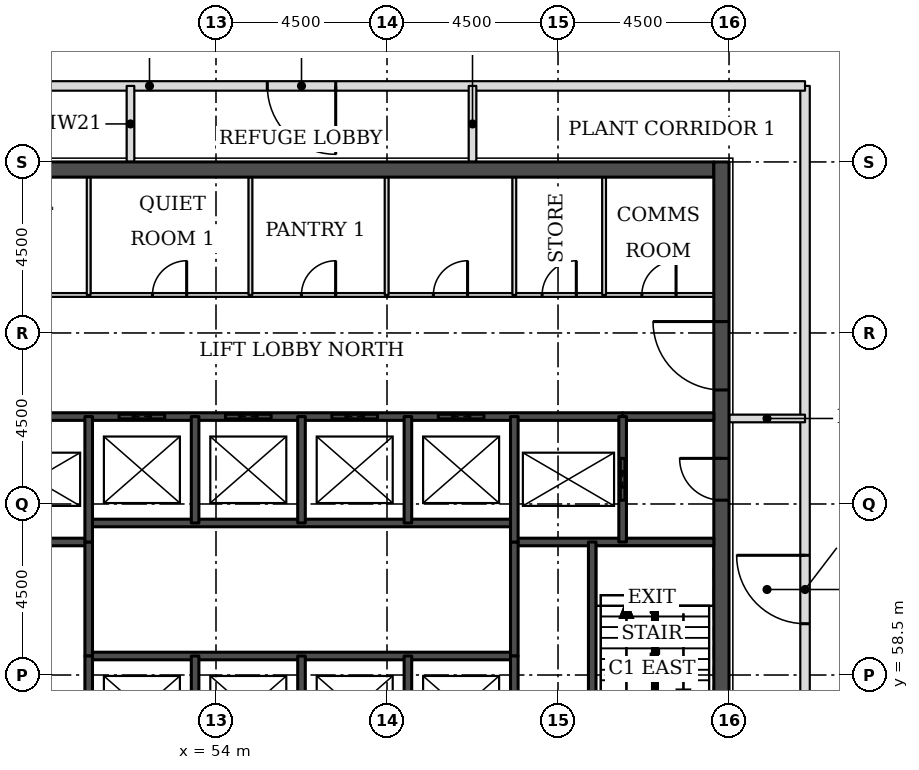
"""IFC4 building model, lengths in metres.
Left out: names, types, materials, properties, quantities, classifications, styles, units other than length and angle.
Written with IfcOpenShell. Run it as: python <this file> out.ifc"""

import sys

from ifc_helpers import new_model, si_unit, direction, frame, frame_2d, origin, place, context, subcontext, project, spatial, rectangle, extrude, element, fill, save


model = new_model("IFC4")
c1 = context("Model", 3, precision=1e-05, world=origin(), true_north=direction((0.0, 1.0)))
c2 = subcontext(c1, "Body", "Model", "MODEL_VIEW")
j1 = project(units=[si_unit("LENGTHUNIT", "METRE"), si_unit("PLANEANGLEUNIT", "RADIAN")], contexts=[c1])
p1 = place(None, origin())
s1 = spatial("IfcSite", under=j1, at=p1, CompositionType="ELEMENT")
p2 = place(p1, origin())
s2 = spatial("IfcBuilding", under=s1, at=p2, CompositionType="ELEMENT")
p3 = place(p2, frame((0.0, 0.0, 206.9)))
s3 = spatial("IfcBuildingStorey", under=s2, at=p3, CompositionType="ELEMENT", Elevation=206.9)
p4 = place(p3, frame((45.4, 71.8, 0.0), z_axis=(0.0, 0.0, 1.0), x_axis=(1.0, 0.0, 0.0)))
e1 = element("IfcWall", 1, at=p4, inside=s3, PredefinedType="SHEAR", context=c2, shape_type="SweptSolid", body=[
    extrude(rectangle(XDim=21.7, YDim=0.4, at=frame_2d((10.85, 0.0))), origin(), (0.0, 0.0, 1.0), 5.0),
])
p5 = place(p3, frame((67.3, 49.5, 0.0), z_axis=(0.0, 0.0, 1.0), x_axis=(0.0, 1.0, 0.0)))
e2 = element("IfcWall", 2, at=p5, inside=s3, PredefinedType="SHEAR", context=c2, shape_type="SweptSolid", body=[
    extrude(rectangle(XDim=22.5, YDim=0.4, at=frame_2d((11.25, 0.0))), origin(), (0.0, 0.0, 1.0), 5.0),
])
p6 = place(p5, frame((4.2, 0.0, 0.0)))
e3 = element("IfcOpeningElement", 3, at=p6, cuts=e2, PredefinedType="OPENING", context=c2, shape_type="SweptSolid", body=[
    extrude(rectangle(XDim=1.8, YDim=2.1, at=frame_2d((0.9, 1.05))), frame((0.0, 0.21, 0.0), z_axis=(0.0, -1.0, 0.0), x_axis=(1.0, 0.0, 0.0)), (0.0, 0.0, 1.0), 0.42),
])
p7 = place(p5, frame((6.9, 0.0, 0.0)))
e4 = element("IfcOpeningElement", 4, at=p7, cuts=e2, PredefinedType="OPENING", context=c2, shape_type="SweptSolid", body=[
    extrude(rectangle(XDim=1.1, YDim=2.1, at=frame_2d((0.55, 1.05))), frame((0.0, 0.21, 0.0), z_axis=(0.0, -1.0, 0.0), x_axis=(1.0, 0.0, 0.0)), (0.0, 0.0, 1.0), 0.42),
])
p8 = place(p5, frame((13.6, 0.0, 0.0)))
e5 = element("IfcOpeningElement", 5, at=p8, cuts=e2, PredefinedType="OPENING", context=c2, shape_type="SweptSolid", body=[
    extrude(rectangle(XDim=1.1, YDim=2.1, at=frame_2d((0.55, 1.05))), frame((0.0, 0.21, 0.0), z_axis=(0.0, -1.0, 0.0), x_axis=(1.0, 0.0, 0.0)), (0.0, 0.0, 1.0), 0.42),
])
p9 = place(p5, frame((16.5, 0.0, 0.0)))
e6 = element("IfcOpeningElement", 6, at=p9, cuts=e2, PredefinedType="OPENING", context=c2, shape_type="SweptSolid", body=[
    extrude(rectangle(XDim=1.8, YDim=2.1, at=frame_2d((0.9, 1.05))), frame((0.0, 0.21, 0.0), z_axis=(0.0, -1.0, 0.0), x_axis=(1.0, 0.0, 0.0)), (0.0, 0.0, 1.0), 0.42),
])
p10 = place(p3, frame((69.5, 47.5, 0.0), z_axis=(0.0, 0.0, 1.0), x_axis=(0.0, 1.0, 0.0)))
e7 = element("IfcWall", 7, at=p10, inside=s3, PredefinedType="PARTITIONING", context=c2, shape_type="SweptSolid", body=[
    extrude(rectangle(XDim=26.5, YDim=0.25, at=frame_2d((13.25, 0.0))), origin(), (0.0, 0.0, 1.0), 4.85),
])
p11 = place(p10, frame((12.35, 0.0, 0.0)))
e8 = element("IfcOpeningElement", 8, at=p11, cuts=e7, PredefinedType="OPENING", context=c2, shape_type="SweptSolid", body=[
    extrude(rectangle(XDim=1.8, YDim=2.1, at=frame_2d((0.9, 1.05))), frame((0.0, 0.135, 0.0), z_axis=(0.0, -1.0, 0.0), x_axis=(1.0, 0.0, 0.0)), (0.0, 0.0, 1.0), 0.27),
])
p12 = place(p3, frame((43.0, 74.0, 0.0), z_axis=(0.0, 0.0, 1.0), x_axis=(1.0, 0.0, 0.0)))
e9 = element("IfcWall", 9, at=p12, inside=s3, PredefinedType="PARTITIONING", context=c2, shape_type="SweptSolid", body=[
    extrude(rectangle(XDim=26.5, YDim=0.25, at=frame_2d((13.25, 0.0))), origin(), (0.0, 0.0, 1.0), 4.85),
])
p13 = place(p12, frame((12.35, 0.0, 0.0)))
e10 = element("IfcOpeningElement", 10, at=p13, cuts=e9, PredefinedType="OPENING", context=c2, shape_type="SweptSolid", body=[
    extrude(rectangle(XDim=1.8, YDim=2.1, at=frame_2d((0.9, 1.05))), frame((0.0, 0.135, 0.0), z_axis=(0.0, -1.0, 0.0), x_axis=(1.0, 0.0, 0.0)), (0.0, 0.0, 1.0), 0.27),
])
for number, where, z_axis, x_axis in (
    (11, (67.5, 65.25, 0.0), (0.0, 0.0, 1.0), (1.0, 0.0, 0.0)),
    (12, (51.75, 72.0, 0.0), (0.0, 0.0, 1.0), (0.0, 1.0, 0.0)),
    (13, (60.75, 72.0, 0.0), (0.0, 0.0, 1.0), (0.0, 1.0, 0.0)),
):
    element("IfcWall", number, at=place(p3, frame(where, z_axis=z_axis, x_axis=x_axis)), inside=s3, PredefinedType="PARTITIONING", context=c2, shape_type="SweptSolid", body=[
        extrude(rectangle(XDim=2.0, YDim=0.2, at=frame_2d((1.0, 0.0))), origin(), (0.0, 0.0, 1.0), 4.85),
    ])
p14 = place(p3, frame((50.65, 59.0, 0.0), z_axis=(0.0, 0.0, 1.0), x_axis=(1.0, 0.0, 0.0)))
e14 = element("IfcWall", 14, at=p14, inside=s3, PredefinedType="SOLIDWALL", context=c2, shape_type="SweptSolid", body=[
    extrude(rectangle(XDim=11.2, YDim=0.2, at=frame_2d((5.6, 0.0))), origin(), (0.0, 0.0, 1.0), 5.0),
])
for number, where, z_axis, x_axis in (
    (15, (45.4, 62.0, 0.0), (0.0, 0.0, 1.0), (1.0, 0.0, 0.0)),
    (16, (61.85, 62.0, 0.0), (0.0, 0.0, 1.0), (1.0, 0.0, 0.0)),
):
    element("IfcWall", number, at=place(p3, frame(where, z_axis=z_axis, x_axis=x_axis)), inside=s3, PredefinedType="SOLIDWALL", context=c2, shape_type="SweptSolid", body=[
        extrude(rectangle(XDim=5.25, YDim=0.2, at=frame_2d((2.625, 0.0))), origin(), (0.0, 0.0, 1.0), 4.85),
    ])
p15 = place(p3, frame((50.65, 62.5, 0.0), z_axis=(0.0, 0.0, 1.0), x_axis=(1.0, 0.0, 0.0)))
e17 = element("IfcWall", 17, at=p15, inside=s3, PredefinedType="SOLIDWALL", context=c2, shape_type="SweptSolid", body=[
    extrude(rectangle(XDim=11.2, YDim=0.2, at=frame_2d((5.6, 0.0))), origin(), (0.0, 0.0, 1.0), 5.0),
])
p16 = place(p3, frame((64.7, 65.3, 0.0), z_axis=(0.0, 0.0, 1.0), x_axis=(1.0, 0.0, 0.0)))
e18 = element("IfcWall", 18, at=p16, inside=s3, PredefinedType="SOLIDWALL", context=c2, shape_type="SweptSolid", body=[
    extrude(rectangle(XDim=2.4, YDim=0.2, at=frame_2d((1.2, 0.0))), origin(), (0.0, 0.0, 1.0), 4.85),
])
p17 = place(p3, frame((47.8, 65.3, 0.0), z_axis=(0.0, 0.0, 1.0), x_axis=(1.0, 0.0, 0.0)))
e19 = element("IfcWall", 19, at=p17, inside=s3, PredefinedType="SOLIDWALL", context=c2, shape_type="SweptSolid", body=[
    extrude(rectangle(XDim=16.9, YDim=0.2, at=frame_2d((8.45, 0.0))), origin(), (0.0, 0.0, 1.0), 4.85),
])
p18 = place(p17, frame((3.65, 0.0, 0.0)))
e20 = element("IfcOpeningElement", 20, at=p18, cuts=e19, PredefinedType="OPENING", context=c2, shape_type="SweptSolid", body=[
    extrude(rectangle(XDim=1.2, YDim=2.1, at=frame_2d((0.6, 1.05))), frame((0.0, 0.11, 0.0), z_axis=(0.0, -1.0, 0.0), x_axis=(1.0, 0.0, 0.0)), (0.0, 0.0, 1.0), 0.22),
])
p19 = place(p17, frame((6.45, 0.0, 0.0)))
e21 = element("IfcOpeningElement", 21, at=p19, cuts=e19, PredefinedType="OPENING", context=c2, shape_type="SweptSolid", body=[
    extrude(rectangle(XDim=1.2, YDim=2.1, at=frame_2d((0.6, 1.05))), frame((0.0, 0.11, 0.0), z_axis=(0.0, -1.0, 0.0), x_axis=(1.0, 0.0, 0.0)), (0.0, 0.0, 1.0), 0.22),
])
p20 = place(p17, frame((9.25, 0.0, 0.0)))
e22 = element("IfcOpeningElement", 22, at=p20, cuts=e19, PredefinedType="OPENING", context=c2, shape_type="SweptSolid", body=[
    extrude(rectangle(XDim=1.2, YDim=2.1, at=frame_2d((0.6, 1.05))), frame((0.0, 0.11, 0.0), z_axis=(0.0, -1.0, 0.0), x_axis=(1.0, 0.0, 0.0)), (0.0, 0.0, 1.0), 0.22),
])
p21 = place(p17, frame((12.05, 0.0, 0.0)))
e23 = element("IfcOpeningElement", 23, at=p21, cuts=e19, PredefinedType="OPENING", context=c2, shape_type="SweptSolid", body=[
    extrude(rectangle(XDim=1.2, YDim=2.1, at=frame_2d((0.6, 1.05))), frame((0.0, 0.11, 0.0), z_axis=(0.0, -1.0, 0.0), x_axis=(1.0, 0.0, 0.0)), (0.0, 0.0, 1.0), 0.22),
])
p22 = place(p3, frame((45.4, 68.5, 0.0), z_axis=(0.0, 0.0, 1.0), x_axis=(1.0, 0.0, 0.0)))
e24 = element("IfcWall", 24, at=p22, inside=s3, PredefinedType="PARTITIONING", context=c2, shape_type="SweptSolid", body=[
    extrude(rectangle(XDim=21.7, YDim=0.1, at=frame_2d((10.85, 0.0))), origin(), (0.0, 0.0, 1.0), 4.85),
])
p23 = place(p22, frame((19.806, 0.0, 0.0)))
e25 = element("IfcOpeningElement", 25, at=p23, cuts=e24, PredefinedType="OPENING", context=c2, shape_type="SweptSolid", body=[
    extrude(rectangle(XDim=0.9, YDim=2.1, at=frame_2d((0.45, 1.05))), frame((0.0, 0.06, 0.0), z_axis=(0.0, -1.0, 0.0), x_axis=(1.0, 0.0, 0.0)), (0.0, 0.0, 1.0), 0.12),
])
p24 = place(p22, frame((17.181, 0.0, 0.0)))
e26 = element("IfcOpeningElement", 26, at=p24, cuts=e24, PredefinedType="OPENING", context=c2, shape_type="SweptSolid", body=[
    extrude(rectangle(XDim=0.9, YDim=2.1, at=frame_2d((0.45, 1.05))), frame((0.0, 0.06, 0.0), z_axis=(0.0, -1.0, 0.0), x_axis=(1.0, 0.0, 0.0)), (0.0, 0.0, 1.0), 0.12),
])
p25 = place(p22, frame((2.175, 0.0, 0.0)))
e27 = element("IfcOpeningElement", 27, at=p25, cuts=e24, PredefinedType="OPENING", context=c2, shape_type="SweptSolid", body=[
    extrude(rectangle(XDim=0.9, YDim=2.1, at=frame_2d((0.45, 1.05))), frame((0.0, 0.06, 0.0), z_axis=(0.0, -1.0, 0.0), x_axis=(1.0, 0.0, 0.0)), (0.0, 0.0, 1.0), 0.12),
])
p26 = place(p22, frame((14.32, 0.0, 0.0)))
e28 = element("IfcOpeningElement", 28, at=p26, cuts=e24, PredefinedType="OPENING", context=c2, shape_type="SweptSolid", body=[
    extrude(rectangle(XDim=0.9, YDim=2.1, at=frame_2d((0.45, 1.05))), frame((0.0, 0.06, 0.0), z_axis=(0.0, -1.0, 0.0), x_axis=(1.0, 0.0, 0.0)), (0.0, 0.0, 1.0), 0.12),
])
p27 = place(p22, frame((10.848, 0.0, 0.0)))
e29 = element("IfcOpeningElement", 29, at=p27, cuts=e24, PredefinedType="OPENING", context=c2, shape_type="SweptSolid", body=[
    extrude(rectangle(XDim=0.9, YDim=2.1, at=frame_2d((0.45, 1.05))), frame((0.0, 0.06, 0.0), z_axis=(0.0, -1.0, 0.0), x_axis=(1.0, 0.0, 0.0)), (0.0, 0.0, 1.0), 0.12),
])
p28 = place(p22, frame((6.928, 0.0, 0.0)))
e30 = element("IfcOpeningElement", 30, at=p28, cuts=e24, PredefinedType="OPENING", context=c2, shape_type="SweptSolid", body=[
    extrude(rectangle(XDim=0.9, YDim=2.1, at=frame_2d((0.45, 1.05))), frame((0.0, 0.06, 0.0), z_axis=(0.0, -1.0, 0.0), x_axis=(1.0, 0.0, 0.0)), (0.0, 0.0, 1.0), 0.12),
])
p29 = place(p3, frame((50.65, 68.5, 0.0), z_axis=(0.0, 0.0, 1.0), x_axis=(0.0, 1.0, 0.0)))
e31 = element("IfcWall", 31, at=p29, inside=s3, PredefinedType="PARTITIONING", context=c2, shape_type="SweptSolid", body=[
    extrude(rectangle(XDim=3.1, YDim=0.1, at=frame_2d((1.55, 0.0))), origin(), (0.0, 0.0, 1.0), 4.85),
])
p30 = place(p3, frame((50.65, 59.0, 0.0), z_axis=(0.0, 0.0, 1.0), x_axis=(0.0, 1.0, 0.0)))
e32 = element("IfcWall", 32, at=p30, inside=s3, PredefinedType="SOLIDWALL", context=c2, shape_type="SweptSolid", body=[
    extrude(rectangle(XDim=3.0, YDim=0.2, at=frame_2d((1.5, 0.0))), origin(), (0.0, 0.0, 1.0), 5.0),
])
p31 = place(p3, frame((50.65, 56.2, 0.0), z_axis=(0.0, 0.0, 1.0), x_axis=(0.0, 1.0, 0.0)))
e33 = element("IfcWall", 33, at=p31, inside=s3, PredefinedType="SOLIDWALL", context=c2, shape_type="SweptSolid", body=[
    extrude(rectangle(XDim=2.8, YDim=0.2, at=frame_2d((1.4, 0.0))), origin(), (0.0, 0.0, 1.0), 4.85),
])
p32 = place(p3, frame((50.65, 62.0, 0.0), z_axis=(0.0, 0.0, 1.0), x_axis=(0.0, 1.0, 0.0)))
e34 = element("IfcWall", 34, at=p32, inside=s3, PredefinedType="SOLIDWALL", context=c2, shape_type="SweptSolid", body=[
    extrude(rectangle(XDim=3.3, YDim=0.2, at=frame_2d((1.65, 0.0))), origin(), (0.0, 0.0, 1.0), 4.85),
])
for number, where, z_axis, x_axis in (
    (35, (53.45, 56.2, 0.0), (0.0, 0.0, 1.0), (0.0, 1.0, 0.0)),
    (36, (53.45, 62.5, 0.0), (0.0, 0.0, 1.0), (0.0, 1.0, 0.0)),
):
    element("IfcWall", number, at=place(p3, frame(where, z_axis=z_axis, x_axis=x_axis)), inside=s3, PredefinedType="SOLIDWALL", context=c2, shape_type="SweptSolid", body=[
        extrude(rectangle(XDim=2.8, YDim=0.2, at=frame_2d((1.4, 0.0))), origin(), (0.0, 0.0, 1.0), 4.85),
    ])
p33 = place(p3, frame((54.906, 68.5, 0.0), z_axis=(0.0, 0.0, 1.0), x_axis=(0.0, 1.0, 0.0)))
e37 = element("IfcWall", 37, at=p33, inside=s3, PredefinedType="PARTITIONING", context=c2, shape_type="SweptSolid", body=[
    extrude(rectangle(XDim=3.1, YDim=0.1, at=frame_2d((1.55, 0.0))), origin(), (0.0, 0.0, 1.0), 4.85),
])
for number, where, z_axis, x_axis in (
    (38, (56.25, 56.2, 0.0), (0.0, 0.0, 1.0), (0.0, 1.0, 0.0)),
    (39, (56.25, 62.5, 0.0), (0.0, 0.0, 1.0), (0.0, 1.0, 0.0)),
):
    element("IfcWall", number, at=place(p3, frame(where, z_axis=z_axis, x_axis=x_axis)), inside=s3, PredefinedType="SOLIDWALL", context=c2, shape_type="SweptSolid", body=[
        extrude(rectangle(XDim=2.8, YDim=0.2, at=frame_2d((1.4, 0.0))), origin(), (0.0, 0.0, 1.0), 4.85),
    ])
p34 = place(p3, frame((58.49, 68.5, 0.0), z_axis=(0.0, 0.0, 1.0), x_axis=(0.0, 1.0, 0.0)))
e40 = element("IfcWall", 40, at=p34, inside=s3, PredefinedType="PARTITIONING", context=c2, shape_type="SweptSolid", body=[
    extrude(rectangle(XDim=3.1, YDim=0.1, at=frame_2d((1.55, 0.0))), origin(), (0.0, 0.0, 1.0), 4.85),
])
for number, where, z_axis, x_axis in (
    (41, (59.05, 56.2, 0.0), (0.0, 0.0, 1.0), (0.0, 1.0, 0.0)),
    (42, (59.05, 62.5, 0.0), (0.0, 0.0, 1.0), (0.0, 1.0, 0.0)),
):
    element("IfcWall", number, at=place(p3, frame(where, z_axis=z_axis, x_axis=x_axis)), inside=s3, PredefinedType="SOLIDWALL", context=c2, shape_type="SweptSolid", body=[
        extrude(rectangle(XDim=2.8, YDim=0.2, at=frame_2d((1.4, 0.0))), origin(), (0.0, 0.0, 1.0), 4.85),
    ])
p35 = place(p3, frame((61.85, 68.5, 0.0), z_axis=(0.0, 0.0, 1.0), x_axis=(0.0, 1.0, 0.0)))
e43 = element("IfcWall", 43, at=p35, inside=s3, PredefinedType="PARTITIONING", context=c2, shape_type="SweptSolid", body=[
    extrude(rectangle(XDim=3.1, YDim=0.1, at=frame_2d((1.55, 0.0))), origin(), (0.0, 0.0, 1.0), 4.85),
])
p36 = place(p3, frame((61.85, 59.0, 0.0), z_axis=(0.0, 0.0, 1.0), x_axis=(0.0, 1.0, 0.0)))
e44 = element("IfcWall", 44, at=p36, inside=s3, PredefinedType="SOLIDWALL", context=c2, shape_type="SweptSolid", body=[
    extrude(rectangle(XDim=3.0, YDim=0.2, at=frame_2d((1.5, 0.0))), origin(), (0.0, 0.0, 1.0), 5.0),
])
p37 = place(p3, frame((61.85, 56.2, 0.0), z_axis=(0.0, 0.0, 1.0), x_axis=(0.0, 1.0, 0.0)))
e45 = element("IfcWall", 45, at=p37, inside=s3, PredefinedType="SOLIDWALL", context=c2, shape_type="SweptSolid", body=[
    extrude(rectangle(XDim=2.8, YDim=0.2, at=frame_2d((1.4, 0.0))), origin(), (0.0, 0.0, 1.0), 4.85),
])
p38 = place(p3, frame((61.85, 62.0, 0.0), z_axis=(0.0, 0.0, 1.0), x_axis=(0.0, 1.0, 0.0)))
e46 = element("IfcWall", 46, at=p38, inside=s3, PredefinedType="SOLIDWALL", context=c2, shape_type="SweptSolid", body=[
    extrude(rectangle(XDim=3.3, YDim=0.2, at=frame_2d((1.65, 0.0))), origin(), (0.0, 0.0, 1.0), 4.85),
])
p39 = place(p3, frame((63.9, 56.2, 0.0), z_axis=(0.0, 0.0, 1.0), x_axis=(0.0, 1.0, 0.0)))
e47 = element("IfcWall", 47, at=p39, inside=s3, PredefinedType="SOLIDWALL", context=c2, shape_type="SweptSolid", body=[
    extrude(rectangle(XDim=5.8, YDim=0.2, at=frame_2d((2.9, 0.0))), origin(), (0.0, 0.0, 1.0), 4.85),
])
p40 = place(p3, frame((64.212, 68.5, 0.0), z_axis=(0.0, 0.0, 1.0), x_axis=(0.0, 1.0, 0.0)))
e48 = element("IfcWall", 48, at=p40, inside=s3, PredefinedType="PARTITIONING", context=c2, shape_type="SweptSolid", body=[
    extrude(rectangle(XDim=3.1, YDim=0.1, at=frame_2d((1.55, 0.0))), origin(), (0.0, 0.0, 1.0), 4.85),
])
p41 = place(p3, frame((64.7, 62.0, 0.0), z_axis=(0.0, 0.0, 1.0), x_axis=(0.0, 1.0, 0.0)))
e49 = element("IfcWall", 49, at=p41, inside=s3, PredefinedType="SOLIDWALL", context=c2, shape_type="SweptSolid", body=[
    extrude(rectangle(XDim=3.3, YDim=0.2, at=frame_2d((1.65, 0.0))), origin(), (0.0, 0.0, 1.0), 4.85),
])
p42 = place(p41, frame((1.1, 0.0, 0.0)))
e50 = element("IfcOpeningElement", 50, at=p42, cuts=e49, PredefinedType="OPENING", context=c2, shape_type="SweptSolid", body=[
    extrude(rectangle(XDim=1.1, YDim=2.1, at=frame_2d((0.55, 1.05))), frame((0.0, 0.11, 0.0), z_axis=(0.0, -1.0, 0.0), x_axis=(1.0, 0.0, 0.0)), (0.0, 0.0, 1.0), 0.22),
])
p43 = place(p13, frame((1.8, 0.0, 0.0), z_axis=(0.0, 0.0, 1.0), x_axis=(-1.0, 0.0, 0.0)))
e51 = element("IfcDoor", 51, at=p43, inside=s3, OperationType="SINGLE_SWING_LEFT", PredefinedType="DOOR", context=c2, shape_type="SweptSolid", body=[
    extrude(rectangle(XDim=1.8, YDim=2.1, at=frame_2d((0.9, 1.05))), frame((0.0, 0.025, 0.0), z_axis=(0.0, -1.0, 0.0), x_axis=(1.0, 0.0, 0.0)), (0.0, 0.0, 1.0), 0.05),
])
fill(e10, e51)
p44 = place(p11, origin())
e52 = element("IfcDoor", 52, at=p44, inside=s3, OperationType="SINGLE_SWING_RIGHT", PredefinedType="DOOR", context=c2, shape_type="SweptSolid", body=[
    extrude(rectangle(XDim=1.8, YDim=2.1, at=frame_2d((0.9, 1.05))), frame((0.0, 0.025, 0.0), z_axis=(0.0, -1.0, 0.0), x_axis=(1.0, 0.0, 0.0)), (0.0, 0.0, 1.0), 0.05),
])
fill(e8, e52)
p45 = place(p18, origin())
e53 = element("IfcDoor", 53, at=p45, inside=s3, OperationType="DOUBLE_DOOR_SLIDING", PredefinedType="DOOR", context=c2, shape_type="SweptSolid", body=[
    extrude(rectangle(XDim=1.2, YDim=2.1, at=frame_2d((0.6, 1.05))), frame((0.0, 0.025, 0.0), z_axis=(0.0, -1.0, 0.0), x_axis=(1.0, 0.0, 0.0)), (0.0, 0.0, 1.0), 0.05),
])
fill(e20, e53)
p46 = place(p19, origin())
e54 = element("IfcDoor", 54, at=p46, inside=s3, OperationType="DOUBLE_DOOR_SLIDING", PredefinedType="DOOR", context=c2, shape_type="SweptSolid", body=[
    extrude(rectangle(XDim=1.2, YDim=2.1, at=frame_2d((0.6, 1.05))), frame((0.0, 0.025, 0.0), z_axis=(0.0, -1.0, 0.0), x_axis=(1.0, 0.0, 0.0)), (0.0, 0.0, 1.0), 0.05),
])
fill(e21, e54)
p47 = place(p20, origin())
e55 = element("IfcDoor", 55, at=p47, inside=s3, OperationType="DOUBLE_DOOR_SLIDING", PredefinedType="DOOR", context=c2, shape_type="SweptSolid", body=[
    extrude(rectangle(XDim=1.2, YDim=2.1, at=frame_2d((0.6, 1.05))), frame((0.0, 0.025, 0.0), z_axis=(0.0, -1.0, 0.0), x_axis=(1.0, 0.0, 0.0)), (0.0, 0.0, 1.0), 0.05),
])
fill(e22, e55)
p48 = place(p21, origin())
e56 = element("IfcDoor", 56, at=p48, inside=s3, OperationType="DOUBLE_DOOR_SLIDING", PredefinedType="DOOR", context=c2, shape_type="SweptSolid", body=[
    extrude(rectangle(XDim=1.2, YDim=2.1, at=frame_2d((0.6, 1.05))), frame((0.0, 0.025, 0.0), z_axis=(0.0, -1.0, 0.0), x_axis=(1.0, 0.0, 0.0)), (0.0, 0.0, 1.0), 0.05),
])
fill(e23, e56)
p49 = place(p42, origin())
e57 = element("IfcDoor", 57, at=p49, inside=s3, OperationType="DOUBLE_DOOR_SLIDING", PredefinedType="DOOR", context=c2, shape_type="SweptSolid", body=[
    extrude(rectangle(XDim=1.1, YDim=2.1, at=frame_2d((0.55, 1.05))), frame((0.0, 0.025, 0.0), z_axis=(0.0, -1.0, 0.0), x_axis=(1.0, 0.0, 0.0)), (0.0, 0.0, 1.0), 0.05),
])
fill(e50, e57)
p50 = place(p8, origin())
e58 = element("IfcDoor", 58, at=p50, inside=s3, OperationType="SINGLE_SWING_RIGHT", PredefinedType="DOOR", context=c2, shape_type="SweptSolid", body=[
    extrude(rectangle(XDim=1.1, YDim=2.1, at=frame_2d((0.55, 1.05))), frame((0.0, 0.025, 0.0), z_axis=(0.0, -1.0, 0.0), x_axis=(1.0, 0.0, 0.0)), (0.0, 0.0, 1.0), 0.05),
])
fill(e5, e58)
p51 = place(p9, origin())
e59 = element("IfcDoor", 59, at=p51, inside=s3, OperationType="SINGLE_SWING_RIGHT", PredefinedType="DOOR", context=c2, shape_type="SweptSolid", body=[
    extrude(rectangle(XDim=1.8, YDim=2.1, at=frame_2d((0.9, 1.05))), frame((0.0, 0.025, 0.0), z_axis=(0.0, -1.0, 0.0), x_axis=(1.0, 0.0, 0.0)), (0.0, 0.0, 1.0), 0.05),
])
fill(e6, e59)
p52 = place(p23, origin())
e60 = element("IfcDoor", 60, at=p52, inside=s3, OperationType="SINGLE_SWING_RIGHT", PredefinedType="DOOR", context=c2, shape_type="SweptSolid", body=[
    extrude(rectangle(XDim=0.9, YDim=2.1, at=frame_2d((0.45, 1.05))), frame((0.0, 0.025, 0.0), z_axis=(0.0, -1.0, 0.0), x_axis=(1.0, 0.0, 0.0)), (0.0, 0.0, 1.0), 0.05),
])
fill(e25, e60)
p53 = place(p24, origin())
e61 = element("IfcDoor", 61, at=p53, inside=s3, OperationType="SINGLE_SWING_RIGHT", PredefinedType="DOOR", context=c2, shape_type="SweptSolid", body=[
    extrude(rectangle(XDim=0.9, YDim=2.1, at=frame_2d((0.45, 1.05))), frame((0.0, 0.025, 0.0), z_axis=(0.0, -1.0, 0.0), x_axis=(1.0, 0.0, 0.0)), (0.0, 0.0, 1.0), 0.05),
])
fill(e26, e61)
p54 = place(p26, origin())
e62 = element("IfcDoor", 62, at=p54, inside=s3, OperationType="SINGLE_SWING_RIGHT", PredefinedType="DOOR", context=c2, shape_type="SweptSolid", body=[
    extrude(rectangle(XDim=0.9, YDim=2.1, at=frame_2d((0.45, 1.05))), frame((0.0, 0.025, 0.0), z_axis=(0.0, -1.0, 0.0), x_axis=(1.0, 0.0, 0.0)), (0.0, 0.0, 1.0), 0.05),
])
fill(e28, e62)
p55 = place(p27, origin())
e63 = element("IfcDoor", 63, at=p55, inside=s3, OperationType="SINGLE_SWING_RIGHT", PredefinedType="DOOR", context=c2, shape_type="SweptSolid", body=[
    extrude(rectangle(XDim=0.9, YDim=2.1, at=frame_2d((0.45, 1.05))), frame((0.0, 0.025, 0.0), z_axis=(0.0, -1.0, 0.0), x_axis=(1.0, 0.0, 0.0)), (0.0, 0.0, 1.0), 0.05),
])
fill(e29, e63)
p56 = place(p28, origin())
e64 = element("IfcDoor", 64, at=p56, inside=s3, OperationType="SINGLE_SWING_RIGHT", PredefinedType="DOOR", context=c2, shape_type="SweptSolid", body=[
    extrude(rectangle(XDim=0.9, YDim=2.1, at=frame_2d((0.45, 1.05))), frame((0.0, 0.025, 0.0), z_axis=(0.0, -1.0, 0.0), x_axis=(1.0, 0.0, 0.0)), (0.0, 0.0, 1.0), 0.05),
])
fill(e30, e64)
save(model, sys.argv[1])
